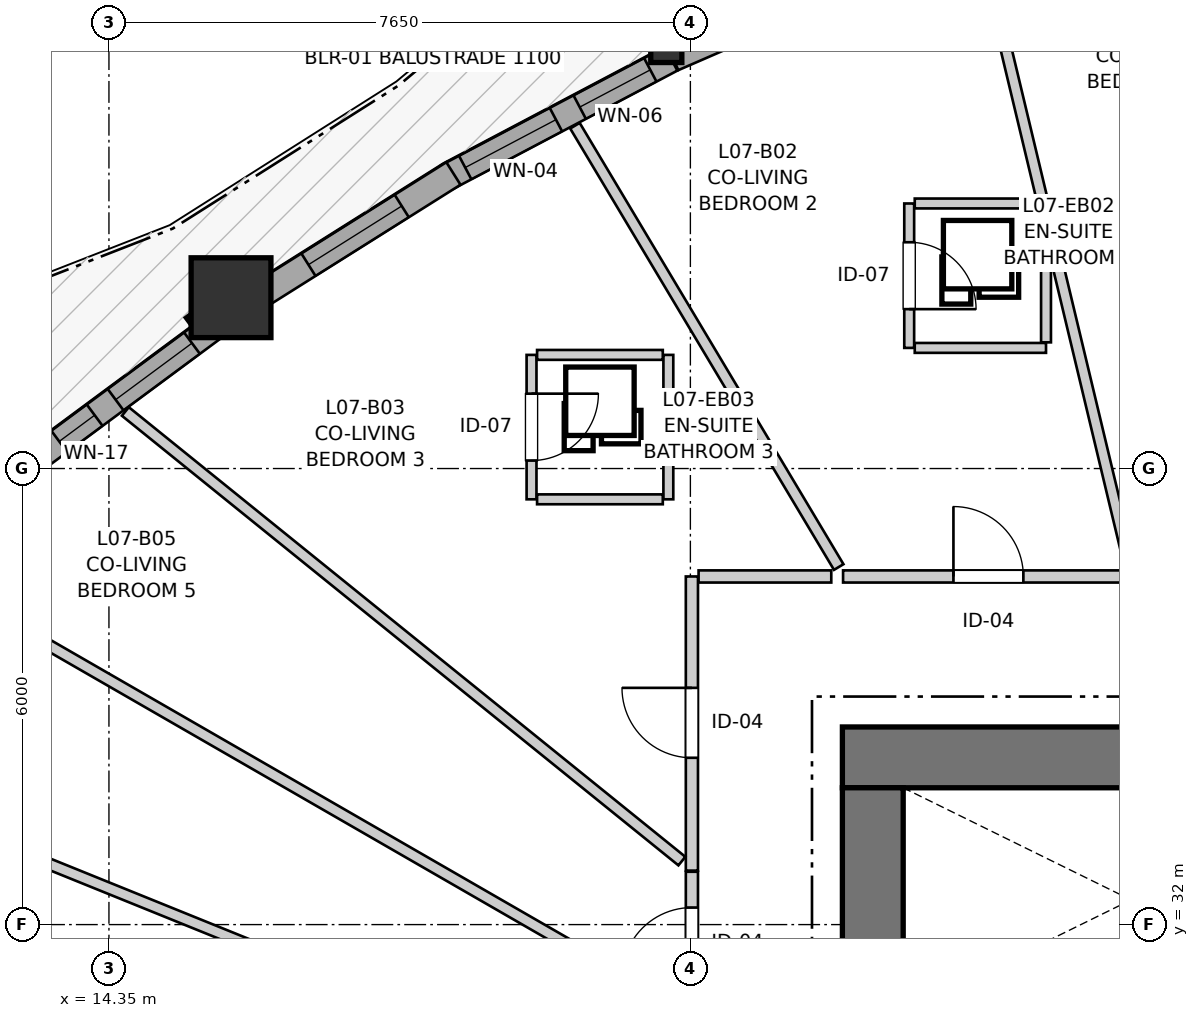
"""IFC4 building model, lengths in metres.
Left out: names, types, materials, properties, quantities, classifications, styles, units other than length and angle.
Written with IfcOpenShell. Run it as: python <this file> out.ifc"""

import sys

from ifc_helpers import new_model, si_unit, direction, frame, frame_2d, origin, origin_2d, place, context, subcontext, project, spatial, rectangle, i_section, extrude, source, transform, mapped, element, fill, save


model = new_model("IFC4")
c1 = context("Model", 3, precision=1e-05, world=origin(), true_north=direction((0.0, 1.0)))
c2 = subcontext(c1, "Body", "Model", "MODEL_VIEW")
j1 = project(units=[si_unit("LENGTHUNIT", "METRE"), si_unit("PLANEANGLEUNIT", "RADIAN")], contexts=[c1])
p1 = place(None, origin())
s1 = spatial("IfcSite", under=j1, at=p1, CompositionType="ELEMENT")
p2 = place(p1, origin())
s2 = spatial("IfcBuilding", under=s1, at=p2, CompositionType="ELEMENT")
p3 = place(p2, frame((0.0, 0.0, 27.0)))
s3 = spatial("IfcBuildingStorey", under=s2, at=p3, CompositionType="ELEMENT", Elevation=27.0)
p4 = place(p3, frame((36.7, 34.2, 0.0), z_axis=(0.0, 0.0, 1.0), x_axis=(-1.0, 0.0, 0.0)))
e1 = element("IfcWall", 1, at=p4, inside=s3, PredefinedType="SHEAR", context=c2, shape_type="SweptSolid", body=[
    extrude(rectangle(XDim=12.7, YDim=0.8, at=frame_2d((6.35, 0.0))), origin(), (0.0, 0.0, 1.0), 2.935),
])
p5 = place(p3, frame((24.4, 33.8, 0.0), z_axis=(0.0, 0.0, 1.0), x_axis=(0.0, -1.0, 0.0)))
e2 = element("IfcWall", 2, at=p5, inside=s3, PredefinedType="SHEAR", context=c2, shape_type="SweptSolid", body=[
    extrude(rectangle(XDim=15.6, YDim=0.8, at=frame_2d((7.8, 0.0))), origin(), (0.0, 0.0, 1.0), 2.935),
])
p6 = place(p5, frame((7.05, 0.0, 0.0)))
e3 = element("IfcOpeningElement", 3, at=p6, cuts=e2, PredefinedType="OPENING", context=c2, shape_type="SweptSolid", body=[
    extrude(rectangle(XDim=1.5, YDim=2.15, at=frame_2d((0.75, 1.075))), frame((0.0, 0.41, 0.0), z_axis=(0.0, -1.0, 0.0), x_axis=(1.0, 0.0, 0.0)), (0.0, 0.0, 1.0), 0.82),
])
p7 = place(p5, frame((3.52, 0.0, 0.0)))
e4 = element("IfcOpeningElement", 4, at=p7, cuts=e2, PredefinedType="OPENING", context=c2, shape_type="SweptSolid", body=[
    extrude(rectangle(XDim=0.86, YDim=2.05, at=frame_2d((0.43, 1.025))), frame((0.0, 0.41, 0.0), z_axis=(0.0, -1.0, 0.0), x_axis=(1.0, 0.0, 0.0)), (0.0, 0.0, 1.0), 0.82),
])
p8 = place(p5, frame((11.22, 0.0, 0.0)))
e5 = element("IfcOpeningElement", 5, at=p8, cuts=e2, PredefinedType="OPENING", context=c2, shape_type="SweptSolid", body=[
    extrude(rectangle(XDim=0.86, YDim=2.05, at=frame_2d((0.43, 1.025))), frame((0.0, 0.41, 0.0), z_axis=(0.0, -1.0, 0.0), x_axis=(1.0, 0.0, 0.0)), (0.0, 0.0, 1.0), 0.82),
])
m1 = source(origin(), c2, "Body", "SweptSolid", [
    extrude(i_section(OverallWidth=0.409, OverallDepth=0.425, WebThickness=0.03, FlangeThickness=0.048, FilletRadius=0.015, at=origin_2d()), origin(), (0.0, 0.0, 1.0), 2.935),
])
p9 = place(p3, frame((21.683, 43.554, 0.0), z_axis=(0.0, 0.0, 1.0), x_axis=(1.0, 0.0, 0.0)))
e6 = element("IfcColumn", 6, at=p9, inside=s3, PredefinedType="PILASTER", context=c2, shape_type="MappedRepresentation", body=[
    mapped(m1, transform((0.0, 0.0, 0.0), x_axis=(1.0, 0.0, 0.0), y_axis=(0.0, 1.0, 0.0), z_axis=(0.0, 0.0, 1.0), scale=1.0)),
])
m2 = source(origin(), c2, "Body", "SweptSolid", [
    extrude(rectangle(XDim=1.05, YDim=1.05, at=origin_2d()), origin(), (0.0, 0.0, 1.0), 2.935),
])
p10 = place(p3, frame((15.956, 40.247, 0.0), z_axis=(0.0, 0.0, 1.0), x_axis=(1.0, 0.0, 0.0)))
e7 = element("IfcColumn", 7, at=p10, inside=s3, PredefinedType="COLUMN", context=c2, shape_type="MappedRepresentation", body=[
    mapped(m2, transform((0.0, 0.0, 0.0), x_axis=(1.0, 0.0, 0.0), y_axis=(0.0, 1.0, 0.0), z_axis=(0.0, 0.0, 1.0), scale=1.0)),
])
p11 = place(p3, frame((24.84, 44.735, 0.0), z_axis=(0.0, 0.0, 1.0), x_axis=(-0.917090935142, -0.398678086532, 0.0)))
e8 = element("IfcWall", 8, at=p11, inside=s3, PredefinedType="SOLIDWALL", context=c2, shape_type="SweptSolid", body=[
    extrude(rectangle(XDim=3.346, YDim=0.35, at=frame_2d((1.673, 0.0))), origin(), (0.0, 0.0, 1.0), 2.415),
])
p12 = place(p11, frame((1.108, 0.0, 0.82)))
e9 = element("IfcOpeningElement", 9, at=p12, cuts=e8, PredefinedType="OPENING", context=c2, shape_type="SweptSolid", body=[
    extrude(rectangle(XDim=1.15, YDim=1.2, at=frame_2d((0.575, 0.6))), frame((0.0, 0.185, 0.0), z_axis=(0.0, -1.0, 0.0), x_axis=(1.0, 0.0, 0.0)), (0.0, 0.0, 1.0), 0.37),
])
p13 = place(p3, frame((21.747, 43.39, 0.0), z_axis=(0.0, 0.0, 1.0), x_axis=(-0.88437802144, -0.46677137358, 0.0)))
e10 = element("IfcWall", 10, at=p13, inside=s3, PredefinedType="SOLIDWALL", context=c2, shape_type="SweptSolid", body=[
    extrude(rectangle(XDim=3.327, YDim=0.35, at=frame_2d((1.664, 0.0))), origin(), (0.0, 0.0, 1.0), 2.415),
])
p14 = place(p13, frame((0.311, 0.0, 0.82)))
e11 = element("IfcOpeningElement", 11, at=p14, cuts=e10, PredefinedType="OPENING", context=c2, shape_type="SweptSolid", body=[
    extrude(rectangle(XDim=1.05, YDim=1.45, at=frame_2d((0.525, 0.725))), frame((0.0, 0.185, 0.0), z_axis=(0.0, -1.0, 0.0), x_axis=(1.0, 0.0, 0.0)), (0.0, 0.0, 1.0), 0.37),
])
p15 = place(p13, frame((1.714, 0.0, 0.82)))
e12 = element("IfcOpeningElement", 12, at=p15, cuts=e10, PredefinedType="OPENING", context=c2, shape_type="SweptSolid", body=[
    extrude(rectangle(XDim=1.35, YDim=1.45, at=frame_2d((0.675, 0.725))), frame((0.0, 0.185, 0.0), z_axis=(0.0, -1.0, 0.0), x_axis=(1.0, 0.0, 0.0)), (0.0, 0.0, 1.0), 0.37),
])
p16 = place(p3, frame((18.882, 41.882, 0.0), z_axis=(0.0, 0.0, 1.0), x_axis=(-0.846428134238, -0.53250297048, 0.0)))
e13 = element("IfcWall", 13, at=p16, inside=s3, PredefinedType="SOLIDWALL", context=c2, shape_type="SweptSolid", body=[
    extrude(rectangle(XDim=3.047, YDim=0.35, at=frame_2d((1.523, 0.0))), origin(), (0.0, 0.0, 1.0), 2.415),
])
p17 = place(p16, frame((0.803, 0.0, 0.82)))
e14 = element("IfcOpeningElement", 14, at=p17, cuts=e13, PredefinedType="OPENING", context=c2, shape_type="SweptSolid", body=[
    extrude(rectangle(XDim=1.45, YDim=1.25, at=frame_2d((0.725, 0.625))), frame((0.0, 0.185, 0.0), z_axis=(0.0, -1.0, 0.0), x_axis=(1.0, 0.0, 0.0)), (0.0, 0.0, 1.0), 0.37),
])
p18 = place(p3, frame((15.819, 39.928, 0.0), z_axis=(0.0, 0.0, 1.0), x_axis=(-0.803825144674, -0.594865645999, 0.0)))
e15 = element("IfcWall", 15, at=p18, inside=s3, PredefinedType="SOLIDWALL", context=c2, shape_type="SweptSolid", body=[
    extrude(rectangle(XDim=3.066, YDim=0.35, at=frame_2d((1.533, 0.0))), origin(), (0.0, 0.0, 1.0), 2.415),
])
p19 = place(p18, frame((0.469, 0.0, 0.82)))
e16 = element("IfcOpeningElement", 16, at=p19, cuts=e15, PredefinedType="OPENING", context=c2, shape_type="SweptSolid", body=[
    extrude(rectangle(XDim=1.25, YDim=1.35, at=frame_2d((0.625, 0.675))), frame((0.0, 0.185, 0.0), z_axis=(0.0, -1.0, 0.0), x_axis=(1.0, 0.0, 0.0)), (0.0, 0.0, 1.0), 0.37),
])
p20 = place(p18, frame((2.062, 0.0, 0.82)))
e17 = element("IfcOpeningElement", 17, at=p20, cuts=e15, PredefinedType="OPENING", context=c2, shape_type="SweptSolid", body=[
    extrude(rectangle(XDim=0.58, YDim=1.35, at=frame_2d((0.29, 0.675))), frame((0.0, 0.185, 0.0), z_axis=(0.0, -1.0, 0.0), x_axis=(1.0, 0.0, 0.0)), (0.0, 0.0, 1.0), 0.37),
])
p21 = place(p3, frame((22.02, 32.71, 0.0), z_axis=(0.0, 0.0, 1.0), x_axis=(0.0, 1.0, 0.0)))
e18 = element("IfcWall", 18, at=p21, inside=s3, PredefinedType="PARTITIONING", context=c2, shape_type="SweptSolid", body=[
    extrude(rectangle(XDim=3.87, YDim=0.16, at=frame_2d((1.935, 0.0))), origin(), (0.0, 0.0, 1.0), 2.935),
])
p22 = place(p21, frame((1.485, 0.0, 0.0)))
e19 = element("IfcOpeningElement", 19, at=p22, cuts=e18, PredefinedType="OPENING", context=c2, shape_type="SweptSolid", body=[
    extrude(rectangle(XDim=0.92, YDim=2.1, at=frame_2d((0.46, 1.05))), frame((0.0, 0.09, 0.0), z_axis=(0.0, -1.0, 0.0), x_axis=(1.0, 0.0, 0.0)), (0.0, 0.0, 1.0), 0.18),
])
p23 = place(p3, frame((24.009, 36.58, 0.0), z_axis=(0.0, 0.0, 1.0), x_axis=(1.0, 0.0, 0.0)))
e20 = element("IfcWall", 20, at=p23, inside=s3, PredefinedType="PARTITIONING", context=c2, shape_type="SweptSolid", body=[
    extrude(rectangle(XDim=3.822, YDim=0.16, at=frame_2d((1.911, 0.0))), origin(), (0.0, 0.0, 1.0), 2.543),
])
p24 = place(p23, frame((1.452, 0.0, 0.0)))
e21 = element("IfcOpeningElement", 21, at=p24, cuts=e20, PredefinedType="OPENING", context=c2, shape_type="SweptSolid", body=[
    extrude(rectangle(XDim=0.92, YDim=2.1, at=frame_2d((0.46, 1.05))), frame((0.0, 0.09, 0.0), z_axis=(0.0, -1.0, 0.0), x_axis=(1.0, 0.0, 0.0)), (0.0, 0.0, 1.0), 0.18),
])
p25 = place(p3, frame((22.02, 30.782, 0.0), z_axis=(0.0, 0.0, 1.0), x_axis=(0.0, 1.0, 0.0)))
e22 = element("IfcWall", 22, at=p25, inside=s3, PredefinedType="PARTITIONING", context=c2, shape_type="SweptSolid", body=[
    extrude(rectangle(XDim=1.913, YDim=0.16, at=frame_2d((0.957, 0.0))), origin(), (0.0, 0.0, 1.0), 2.935),
])
p26 = place(p25, frame((0.522, 0.0, 0.0)))
e23 = element("IfcOpeningElement", 23, at=p26, cuts=e22, PredefinedType="OPENING", context=c2, shape_type="SweptSolid", body=[
    extrude(rectangle(XDim=0.92, YDim=2.1, at=frame_2d((0.46, 1.05))), frame((0.0, 0.09, 0.0), z_axis=(0.0, -1.0, 0.0), x_axis=(1.0, 0.0, 0.0)), (0.0, 0.0, 1.0), 0.18),
])
p27 = place(p3, frame((24.879, 41.487, 0.0), z_axis=(0.0, 0.0, 1.0), x_axis=(0.0, -1.0, 0.0)))
e24 = element("IfcWall", 24, at=p27, inside=s3, PredefinedType="PARTITIONING", context=c2, shape_type="SweptSolid", body=[
    extrude(rectangle(XDim=1.9, YDim=0.13, at=frame_2d((0.95, 0.0))), origin(), (0.0, 0.0, 1.0), 2.935),
])
p28 = place(p27, frame((0.51, 0.0, 0.0)))
e25 = element("IfcOpeningElement", 25, at=p28, cuts=e24, PredefinedType="OPENING", context=c2, shape_type="SweptSolid", body=[
    extrude(rectangle(XDim=0.88, YDim=2.05, at=frame_2d((0.44, 1.025))), frame((0.0, 0.075, 0.0), z_axis=(0.0, -1.0, 0.0), x_axis=(1.0, 0.0, 0.0)), (0.0, 0.0, 1.0), 0.15),
])
p29 = place(p3, frame((19.91, 39.495, 0.0), z_axis=(0.0, 0.0, 1.0), x_axis=(0.0, -1.0, 0.0)))
e26 = element("IfcWall", 26, at=p29, inside=s3, PredefinedType="PARTITIONING", context=c2, shape_type="SweptSolid", body=[
    extrude(rectangle(XDim=1.9, YDim=0.13, at=frame_2d((0.95, 0.0))), origin(), (0.0, 0.0, 1.0), 2.935),
])
p30 = place(p29, frame((0.51, 0.0, 0.0)))
e27 = element("IfcOpeningElement", 27, at=p30, cuts=e26, PredefinedType="OPENING", context=c2, shape_type="SweptSolid", body=[
    extrude(rectangle(XDim=0.88, YDim=2.05, at=frame_2d((0.44, 1.025))), frame((0.0, 0.075, 0.0), z_axis=(0.0, -1.0, 0.0), x_axis=(1.0, 0.0, 0.0)), (0.0, 0.0, 1.0), 0.15),
])
p31 = place(p3, frame((9.577, 34.41, 0.0), z_axis=(0.0, 0.0, 1.0), x_axis=(0.926920362809, -0.375258099194, 0.0)))
e28 = element("IfcWall", 28, at=p31, inside=s3, PredefinedType="PARTITIONING", context=c2, shape_type="SweptSolid", body=[
    extrude(rectangle(XDim=13.3, YDim=0.145, at=frame_2d((6.65, 0.0))), origin(), (0.0, 0.0, 1.0), 2.935),
])
p32 = place(p3, frame((11.92, 36.618, 0.0), z_axis=(0.0, 0.0, 1.0), x_axis=(0.866473494239, -0.499223080177, 0.0)))
e29 = element("IfcWall", 29, at=p32, inside=s3, PredefinedType="PARTITIONING", context=c2, shape_type="SweptSolid", body=[
    extrude(rectangle(XDim=11.514, YDim=0.145, at=frame_2d((5.757, 0.0))), origin(), (0.0, 0.0, 1.0), 2.935),
])
p33 = place(p3, frame((14.566, 38.751, 0.0), z_axis=(0.0, 0.0, 1.0), x_axis=(0.777881688073, -0.628410756879, 0.0)))
e30 = element("IfcWall", 30, at=p33, inside=s3, PredefinedType="PARTITIONING", context=c2, shape_type="SweptSolid", body=[
    extrude(rectangle(XDim=9.413, YDim=0.145, at=frame_2d((4.707, 0.0))), origin(), (0.0, 0.0, 1.0), 2.935),
])
p34 = place(p3, frame((20.481, 42.51, 0.0), z_axis=(0.0, 0.0, 1.0), x_axis=(0.513067331262, -0.858348363773, 0.0)))
e31 = element("IfcWall", 31, at=p34, inside=s3, PredefinedType="PARTITIONING", context=c2, shape_type="SweptSolid", body=[
    extrude(rectangle(XDim=6.765, YDim=0.145, at=frame_2d((3.382, 0.0))), origin(), (0.0, 0.0, 1.0), 2.935),
])
p35 = place(p3, frame((26.664, 41.388, 0.0), z_axis=(0.0, 0.0, 1.0), x_axis=(0.233021630241, -0.972471552201, 0.0)))
e32 = element("IfcWall", 32, at=p35, inside=s3, PredefinedType="PARTITIONING", context=c2, shape_type="SweptSolid", body=[
    extrude(rectangle(XDim=4.836, YDim=0.145, at=frame_2d((2.418, 0.0))), origin(), (0.0, 0.0, 1.0), 2.935),
])
p36 = place(p3, frame((25.829, 44.875, 0.0), z_axis=(0.0, 0.0, 1.0), x_axis=(0.232921769711, -0.972495475154, 0.0)))
e33 = element("IfcWall", 33, at=p36, inside=s3, PredefinedType="PARTITIONING", context=c2, shape_type="SweptSolid", body=[
    extrude(rectangle(XDim=3.5, YDim=0.145, at=frame_2d((1.75, 0.0))), origin(), (0.0, 0.0, 1.0), 2.935),
])
p37 = place(p3, frame((22.108, 36.58, 0.0), z_axis=(0.0, 0.0, 1.0), x_axis=(1.0, 0.0, 0.0)))
e34 = element("IfcWall", 34, at=p37, inside=s3, PredefinedType="PARTITIONING", context=c2, shape_type="SweptSolid", body=[
    extrude(rectangle(XDim=1.746, YDim=0.16, at=frame_2d((0.873, 0.0))), origin(), (0.0, 0.0, 1.0), 2.543),
])
p38 = place(p3, frame((21.71, 37.595, 0.0), z_axis=(0.0, 0.0, 1.0), x_axis=(0.0, 1.0, 0.0)))
e35 = element("IfcWall", 35, at=p38, inside=s3, PredefinedType="PARTITIONING", context=c2, shape_type="SweptSolid", body=[
    extrude(rectangle(XDim=1.9, YDim=0.13, at=frame_2d((0.95, 0.0))), origin(), (0.0, 0.0, 1.0), 2.935),
])
for number, where, z_axis, x_axis in (
    (36, (19.983, 39.495, 0.0), (0.0, 0.0, 1.0), (1.0, 0.0, 0.0)),
    (37, (19.983, 37.595, 0.0), (0.0, 0.0, 1.0), (1.0, 0.0, 0.0)),
):
    element("IfcWall", number, at=place(p3, frame(where, z_axis=z_axis, x_axis=x_axis)), inside=s3, PredefinedType="PARTITIONING", context=c2, shape_type="SweptSolid", body=[
        extrude(rectangle(XDim=1.654, YDim=0.13, at=frame_2d((0.827, 0.0))), origin(), (0.0, 0.0, 1.0), 2.935),
    ])
p39 = place(p3, frame((24.952, 39.587, 0.0), z_axis=(0.0, 0.0, 1.0), x_axis=(1.0, 0.0, 0.0)))
e38 = element("IfcWall", 38, at=p39, inside=s3, PredefinedType="PARTITIONING", context=c2, shape_type="SweptSolid", body=[
    extrude(rectangle(XDim=1.727, YDim=0.13, at=frame_2d((0.864, 0.0))), origin(), (0.0, 0.0, 1.0), 2.935),
])
p40 = place(p3, frame((24.952, 41.487, 0.0), z_axis=(0.0, 0.0, 1.0), x_axis=(1.0, 0.0, 0.0)))
e39 = element("IfcWall", 39, at=p40, inside=s3, PredefinedType="PARTITIONING", context=c2, shape_type="SweptSolid", body=[
    extrude(rectangle(XDim=1.59, YDim=0.13, at=frame_2d((0.795, 0.0))), origin(), (0.0, 0.0, 1.0), 2.503),
])
p41 = place(p3, frame((26.679, 39.66, 0.0), z_axis=(0.0, 0.0, 1.0), x_axis=(0.0, 1.0, 0.0)))
e40 = element("IfcWall", 40, at=p41, inside=s3, PredefinedType="PARTITIONING", context=c2, shape_type="SweptSolid", body=[
    extrude(rectangle(XDim=1.38, YDim=0.13, at=frame_2d((0.69, 0.0))), origin(), (0.0, 0.0, 1.0), 2.935),
])
m3 = source(origin(), c2, "Body", "SweptSolid", [
    extrude(rectangle(XDim=1.05, YDim=1.45, at=frame_2d((0.525, 0.725))), frame((0.0, 0.03, 0.0), z_axis=(0.0, -1.0, 0.0), x_axis=(1.0, 0.0, 0.0)), (0.0, 0.0, 1.0), 0.06),
])
p42 = place(p14, origin())
e41 = element("IfcWindow", 41, at=p42, inside=s3, PartitioningType="SINGLE_PANEL", PredefinedType="WINDOW", context=c2, shape_type="MappedRepresentation", body=[
    mapped(m3, transform((0.0, 0.0, 0.0), x_axis=(1.0, 0.0, 0.0), y_axis=(0.0, 1.0, 0.0), z_axis=(0.0, 0.0, 1.0), scale=1.0)),
])
fill(e11, e41)
m4 = source(origin(), c2, "Body", "SweptSolid", [
    extrude(rectangle(XDim=1.35, YDim=1.45, at=frame_2d((0.675, 0.725))), frame((0.0, 0.03, 0.0), z_axis=(0.0, -1.0, 0.0), x_axis=(1.0, 0.0, 0.0)), (0.0, 0.0, 1.0), 0.06),
])
p43 = place(p15, origin())
e42 = element("IfcWindow", 42, at=p43, inside=s3, PartitioningType="SINGLE_PANEL", PredefinedType="WINDOW", context=c2, shape_type="MappedRepresentation", body=[
    mapped(m4, transform((0.0, 0.0, 0.0), x_axis=(1.0, 0.0, 0.0), y_axis=(0.0, 1.0, 0.0), z_axis=(0.0, 0.0, 1.0), scale=1.0)),
])
fill(e12, e42)
m5 = source(origin(), c2, "Body", "SweptSolid", [
    extrude(rectangle(XDim=1.45, YDim=1.25, at=frame_2d((0.725, 0.625))), frame((0.0, 0.03, 0.0), z_axis=(0.0, -1.0, 0.0), x_axis=(1.0, 0.0, 0.0)), (0.0, 0.0, 1.0), 0.06),
])
p44 = place(p17, origin())
e43 = element("IfcWindow", 43, at=p44, inside=s3, PartitioningType="SINGLE_PANEL", PredefinedType="WINDOW", context=c2, shape_type="MappedRepresentation", body=[
    mapped(m5, transform((0.0, 0.0, 0.0), x_axis=(1.0, 0.0, 0.0), y_axis=(0.0, 1.0, 0.0), z_axis=(0.0, 0.0, 1.0), scale=1.0)),
])
fill(e14, e43)
m6 = source(origin(), c2, "Body", "SweptSolid", [
    extrude(rectangle(XDim=1.25, YDim=1.35, at=frame_2d((0.625, 0.675))), frame((0.0, 0.03, 0.0), z_axis=(0.0, -1.0, 0.0), x_axis=(1.0, 0.0, 0.0)), (0.0, 0.0, 1.0), 0.06),
])
p45 = place(p19, origin())
e44 = element("IfcWindow", 44, at=p45, inside=s3, PartitioningType="SINGLE_PANEL", PredefinedType="WINDOW", context=c2, shape_type="MappedRepresentation", body=[
    mapped(m6, transform((0.0, 0.0, 0.0), x_axis=(1.0, 0.0, 0.0), y_axis=(0.0, 1.0, 0.0), z_axis=(0.0, 0.0, 1.0), scale=1.0)),
])
fill(e16, e44)
m7 = source(origin(), c2, "Body", "SweptSolid", [
    extrude(rectangle(XDim=0.58, YDim=1.35, at=frame_2d((0.29, 0.675))), frame((0.0, 0.03, 0.0), z_axis=(0.0, -1.0, 0.0), x_axis=(1.0, 0.0, 0.0)), (0.0, 0.0, 1.0), 0.06),
])
p46 = place(p20, origin())
e45 = element("IfcWindow", 45, at=p46, inside=s3, PartitioningType="SINGLE_PANEL", PredefinedType="WINDOW", context=c2, shape_type="MappedRepresentation", body=[
    mapped(m7, transform((0.0, 0.0, 0.0), x_axis=(1.0, 0.0, 0.0), y_axis=(0.0, 1.0, 0.0), z_axis=(0.0, 0.0, 1.0), scale=1.0)),
])
fill(e17, e45)
m8 = source(origin(), c2, "Body", "SweptSolid", [
    extrude(rectangle(XDim=0.92, YDim=2.1, at=frame_2d((0.46, 1.05))), frame((0.0, 0.025, 0.0), z_axis=(0.0, -1.0, 0.0), x_axis=(1.0, 0.0, 0.0)), (0.0, 0.0, 1.0), 0.05),
])
p47 = place(p22, origin())
e46 = element("IfcDoor", 46, at=p47, inside=s3, OperationType="SINGLE_SWING_RIGHT", PredefinedType="DOOR", context=c2, shape_type="MappedRepresentation", body=[
    mapped(m8, transform((0.0, 0.0, 0.0), x_axis=(1.0, 0.0, 0.0), y_axis=(0.0, 1.0, 0.0), z_axis=(0.0, 0.0, 1.0), scale=1.0)),
])
fill(e19, e46)
p48 = place(p24, origin())
e47 = element("IfcDoor", 47, at=p48, inside=s3, OperationType="SINGLE_SWING_LEFT", PredefinedType="DOOR", context=c2, shape_type="MappedRepresentation", body=[
    mapped(m8, transform((0.0, 0.0, 0.0), x_axis=(1.0, 0.0, 0.0), y_axis=(0.0, 1.0, 0.0), z_axis=(0.0, 0.0, 1.0), scale=1.0)),
])
fill(e21, e47)
p49 = place(p26, origin())
e48 = element("IfcDoor", 48, at=p49, inside=s3, OperationType="SINGLE_SWING_LEFT", PredefinedType="DOOR", context=c2, shape_type="MappedRepresentation", body=[
    mapped(m8, transform((0.0, 0.0, 0.0), x_axis=(1.0, 0.0, 0.0), y_axis=(0.0, 1.0, 0.0), z_axis=(0.0, 0.0, 1.0), scale=1.0)),
])
fill(e23, e48)
m9 = source(origin(), c2, "Body", "SweptSolid", [
    extrude(rectangle(XDim=0.88, YDim=2.05, at=frame_2d((0.44, 1.025))), frame((0.0, 0.025, 0.0), z_axis=(0.0, -1.0, 0.0), x_axis=(1.0, 0.0, 0.0)), (0.0, 0.0, 1.0), 0.05),
])
p50 = place(p28, origin())
e49 = element("IfcDoor", 49, at=p50, inside=s3, OperationType="SINGLE_SWING_RIGHT", PredefinedType="DOOR", context=c2, shape_type="MappedRepresentation", body=[
    mapped(m9, transform((0.0, 0.0, 0.0), x_axis=(1.0, 0.0, 0.0), y_axis=(0.0, 1.0, 0.0), z_axis=(0.0, 0.0, 1.0), scale=1.0)),
])
fill(e25, e49)
p51 = place(p30, origin())
e50 = element("IfcDoor", 50, at=p51, inside=s3, OperationType="SINGLE_SWING_LEFT", PredefinedType="DOOR", context=c2, shape_type="MappedRepresentation", body=[
    mapped(m9, transform((0.0, 0.0, 0.0), x_axis=(1.0, 0.0, 0.0), y_axis=(0.0, 1.0, 0.0), z_axis=(0.0, 0.0, 1.0), scale=1.0)),
])
fill(e27, e50)
save(model, sys.argv[1])
